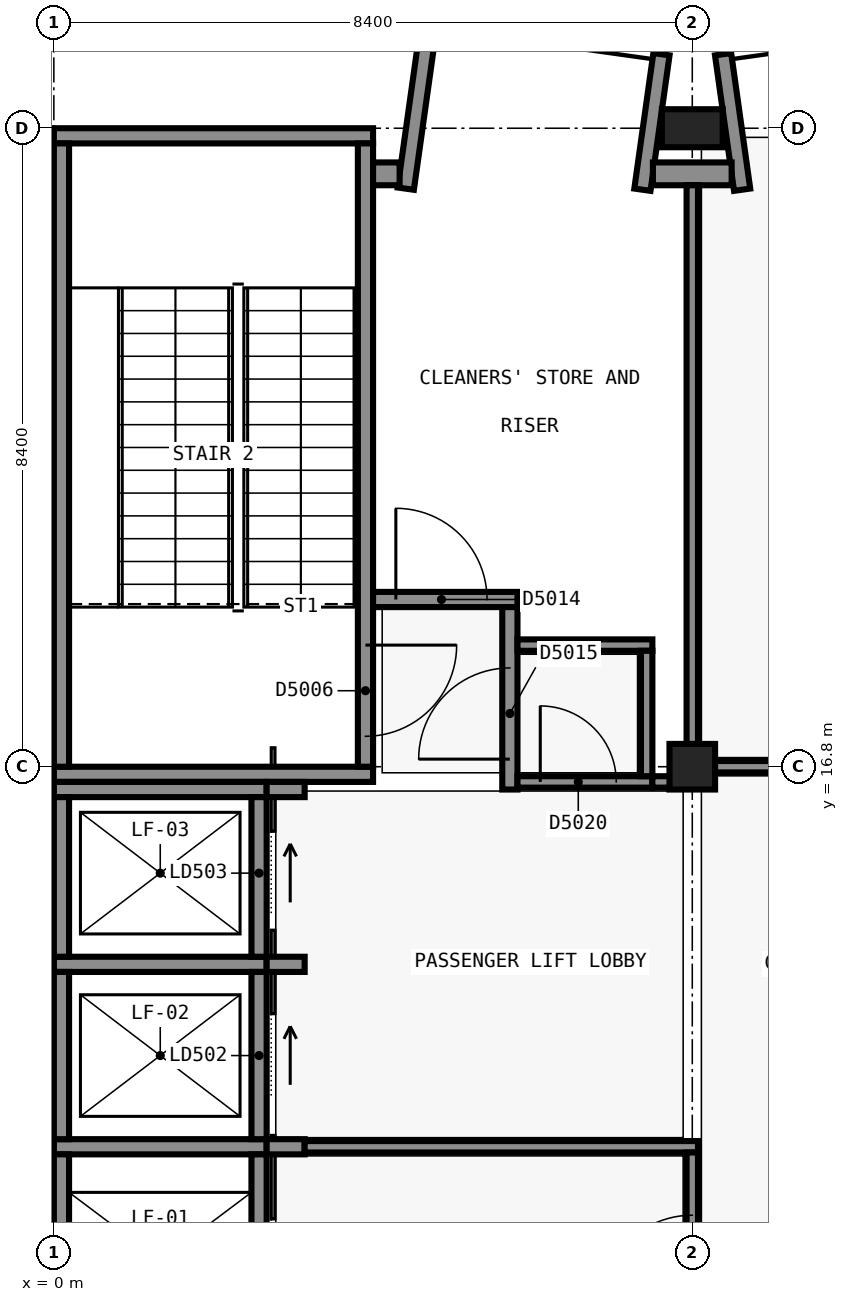
"""IFC4 building model, lengths in metres.
Left out: names, types, materials, properties, quantities, classifications, styles, units other than length and angle.
Written with IfcOpenShell. Run it as: python <this file> out.ifc"""

import sys

from ifc_helpers import new_model, si_unit, direction, frame, frame_2d, origin, origin_2d, place, context, subcontext, project, spatial, rectangle, extrude, element, fill, save


model = new_model("IFC4")
c1 = context("Model", 3, precision=1e-05, world=origin(), true_north=direction((0.0, 1.0)))
c2 = subcontext(c1, "Body", "Model", "MODEL_VIEW")
j1 = project(units=[si_unit("LENGTHUNIT", "METRE"), si_unit("PLANEANGLEUNIT", "RADIAN")], contexts=[c1])
p1 = place(None, origin())
s1 = spatial("IfcSite", under=j1, at=p1, CompositionType="ELEMENT")
p2 = place(p1, origin())
s2 = spatial("IfcBuilding", under=s1, at=p2, CompositionType="ELEMENT")
p3 = place(p2, frame((0.0, 0.0, 24.6)))
s3 = spatial("IfcBuildingStorey", under=s2, at=p3, CompositionType="ELEMENT", Elevation=24.6)
for number, where, z_axis, x_axis in (
    (1, (4.2, 16.7, 0.0), (0.0, 0.0, 1.0), (-1.0, 0.0, 0.0)),
    (2, (0.0, 25.1, 0.0), (0.0, 0.0, 1.0), (1.0, 0.0, 0.0)),
):
    element("IfcWall", number, at=place(p3, frame(where, z_axis=z_axis, x_axis=x_axis)), inside=s3, PredefinedType="SHEAR", context=c2, shape_type="SweptSolid", body=[
        extrude(rectangle(XDim=4.199, YDim=0.2, at=frame_2d((2.1, 0.0))), origin(), (0.0, 0.0, 1.0), 4.5),
    ])
p4 = place(p3, frame((0.1, 16.8, 0.0), z_axis=(0.0, 0.0, 1.0), x_axis=(0.0, 1.0, 0.0)))
e3 = element("IfcWall", 3, at=p4, inside=s3, PredefinedType="SHEAR", context=c2, shape_type="SweptSolid", body=[
    extrude(rectangle(XDim=8.2, YDim=0.2, at=frame_2d((4.1, 0.0))), origin(), (0.0, 0.0, 1.0), 4.5),
])
p5 = place(p3, frame((4.1, 25.0, 0.0), z_axis=(0.0, 0.0, 1.0), x_axis=(0.0, -1.0, 0.0)))
e4 = element("IfcWall", 4, at=p5, inside=s3, PredefinedType="SHEAR", context=c2, shape_type="SweptSolid", body=[
    extrude(rectangle(XDim=8.2, YDim=0.2, at=frame_2d((4.1, 0.0))), origin(), (0.0, 0.0, 1.0), 4.5),
])
p6 = place(p5, frame((6.6, 0.0, 0.0)))
e5 = element("IfcOpeningElement", 5, at=p6, cuts=e4, PredefinedType="OPENING", context=c2, shape_type="SweptSolid", body=[
    extrude(rectangle(XDim=1.2, YDim=2.1, at=frame_2d((0.6, 1.05))), frame((0.0, 0.11, 0.0), z_axis=(0.0, -1.0, 0.0), x_axis=(1.0, 0.0, 0.0)), (0.0, 0.0, 1.0), 0.22),
])
p7 = place(p3, frame((0.0, 11.8, 0.0), z_axis=(0.0, 0.0, 1.0), x_axis=(1.0, 0.0, 0.0)))
e6 = element("IfcWall", 6, at=p7, inside=s3, PredefinedType="SHEAR", context=c2, shape_type="SweptSolid", body=[
    extrude(rectangle(XDim=2.8, YDim=0.2, at=frame_2d((1.4, 0.0))), origin(), (0.0, 0.0, 1.0), 4.5),
])
p8 = place(p3, frame((0.1, 9.0, 0.0), z_axis=(0.0, 0.0, 1.0), x_axis=(0.0, 1.0, 0.0)))
e7 = element("IfcWall", 7, at=p8, inside=s3, PredefinedType="SHEAR", context=c2, shape_type="SweptSolid", body=[
    extrude(rectangle(XDim=2.7, YDim=0.2, at=frame_2d((1.35, 0.0))), origin(), (0.0, 0.0, 1.0), 4.5),
])
p9 = place(p3, frame((2.7, 11.7, 0.0), z_axis=(0.0, 0.0, 1.0), x_axis=(0.0, -1.0, 0.0)))
e8 = element("IfcWall", 8, at=p9, inside=s3, PredefinedType="SHEAR", context=c2, shape_type="SweptSolid", body=[
    extrude(rectangle(XDim=2.7, YDim=0.2, at=frame_2d((1.35, 0.0))), origin(), (0.0, 0.0, 1.0), 4.5),
])
p10 = place(p9, frame((0.85, 0.0, 0.0)))
e9 = element("IfcOpeningElement", 9, at=p10, cuts=e8, PredefinedType="OPENING", context=c2, shape_type="SweptSolid", body=[
    extrude(rectangle(XDim=1.1, YDim=2.1, at=frame_2d((0.55, 1.05))), frame((0.0, 0.11, 0.0), z_axis=(0.0, -1.0, 0.0), x_axis=(1.0, 0.0, 0.0)), (0.0, 0.0, 1.0), 0.22),
])
p11 = place(p3, frame((0.0, 14.2, 0.0), z_axis=(0.0, 0.0, 1.0), x_axis=(1.0, 0.0, 0.0)))
e10 = element("IfcWall", 10, at=p11, inside=s3, PredefinedType="SHEAR", context=c2, shape_type="SweptSolid", body=[
    extrude(rectangle(XDim=2.8, YDim=0.2, at=frame_2d((1.4, 0.0))), origin(), (0.0, 0.0, 1.0), 4.5),
])
p12 = place(p3, frame((0.1, 11.9, 0.0), z_axis=(0.0, 0.0, 1.0), x_axis=(0.0, 1.0, 0.0)))
e11 = element("IfcWall", 11, at=p12, inside=s3, PredefinedType="SHEAR", context=c2, shape_type="SweptSolid", body=[
    extrude(rectangle(XDim=2.2, YDim=0.2, at=frame_2d((1.1, 0.0))), origin(), (0.0, 0.0, 1.0), 4.5),
])
p13 = place(p3, frame((2.7, 14.1, 0.0), z_axis=(0.0, 0.0, 1.0), x_axis=(0.0, -1.0, 0.0)))
e12 = element("IfcWall", 12, at=p13, inside=s3, PredefinedType="SHEAR", context=c2, shape_type="SweptSolid", body=[
    extrude(rectangle(XDim=2.2, YDim=0.2, at=frame_2d((1.1, 0.0))), origin(), (0.0, 0.0, 1.0), 4.5),
])
p14 = place(p13, frame((0.55, 0.0, 0.0)))
e13 = element("IfcOpeningElement", 13, at=p14, cuts=e12, PredefinedType="OPENING", context=c2, shape_type="SweptSolid", body=[
    extrude(rectangle(XDim=1.1, YDim=2.1, at=frame_2d((0.55, 1.05))), frame((0.0, 0.11, 0.0), z_axis=(0.0, -1.0, 0.0), x_axis=(1.0, 0.0, 0.0)), (0.0, 0.0, 1.0), 0.22),
])
p15 = place(p3, frame((0.0, 16.5, 0.0), z_axis=(0.0, 0.0, 1.0), x_axis=(1.0, 0.0, 0.0)))
e14 = element("IfcWall", 14, at=p15, inside=s3, PredefinedType="SHEAR", context=c2, shape_type="SweptSolid", body=[
    extrude(rectangle(XDim=2.8, YDim=0.2, at=frame_2d((1.4, 0.0))), origin(), (0.0, 0.0, 1.0), 4.5),
])
p16 = place(p3, frame((0.1, 14.3, 0.0), z_axis=(0.0, 0.0, 1.0), x_axis=(0.0, 1.0, 0.0)))
e15 = element("IfcWall", 15, at=p16, inside=s3, PredefinedType="SHEAR", context=c2, shape_type="SweptSolid", body=[
    extrude(rectangle(XDim=2.1, YDim=0.2, at=frame_2d((1.05, 0.0))), origin(), (0.0, 0.0, 1.0), 4.5),
])
p17 = place(p3, frame((2.7, 16.4, 0.0), z_axis=(0.0, 0.0, 1.0), x_axis=(0.0, -1.0, 0.0)))
e16 = element("IfcWall", 16, at=p17, inside=s3, PredefinedType="SHEAR", context=c2, shape_type="SweptSolid", body=[
    extrude(rectangle(XDim=2.1, YDim=0.2, at=frame_2d((1.05, 0.0))), origin(), (0.0, 0.0, 1.0), 4.5),
])
p18 = place(p17, frame((0.45, 0.0, 0.0)))
e17 = element("IfcOpeningElement", 17, at=p18, cuts=e16, PredefinedType="OPENING", context=c2, shape_type="SweptSolid", body=[
    extrude(rectangle(XDim=1.1, YDim=2.1, at=frame_2d((0.55, 1.05))), frame((0.0, 0.11, 0.0), z_axis=(0.0, -1.0, 0.0), x_axis=(1.0, 0.0, 0.0)), (0.0, 0.0, 1.0), 0.22),
])
p19 = place(p3, frame((8.4, 16.8, 0.0), z_axis=(0.0, 0.0, 1.0), x_axis=(1.0, 0.0, 0.0)))
e18 = element("IfcColumn", 18, at=p19, inside=s3, PredefinedType="COLUMN", context=c2, shape_type="SweptSolid", body=[
    extrude(rectangle(XDim=0.6, YDim=0.6, at=origin_2d()), origin(), (0.0, 0.0, 1.0), 4.5),
])
p20 = place(p3, frame((8.4, 25.2, 0.0), z_axis=(0.0, 0.0, 1.0), x_axis=(1.0, 0.0, 0.0)))
e19 = element("IfcColumn", 19, at=p20, inside=s3, PredefinedType="COLUMN", context=c2, shape_type="SweptSolid", body=[
    extrude(rectangle(XDim=0.8, YDim=0.5, at=origin_2d()), origin(), (0.0, 0.0, 1.0), 4.5),
])
for number, where, z_axis, x_axis in (
    (20, (2.8, 11.8, 0.0), (0.0, 0.0, 1.0), (1.0, 0.0, 0.0)),
    (21, (2.8, 14.2, 0.0), (0.0, 0.0, 1.0), (1.0, 0.0, 0.0)),
    (22, (2.8, 16.5, 0.0), (0.0, 0.0, 1.0), (1.0, 0.0, 0.0)),
):
    element("IfcWall", number, at=place(p3, frame(where, z_axis=z_axis, x_axis=x_axis)), inside=s3, PredefinedType="SHEAR", context=c2, shape_type="SweptSolid", body=[
        extrude(rectangle(XDim=0.5, YDim=0.2, at=frame_2d((0.25, 0.0))), origin(), (0.0, 0.0, 1.0), 4.5),
    ])
p21 = place(p3, frame((4.631, 24.405, 0.0), z_axis=(0.0, 0.0, 1.0), x_axis=(0.139141913905, 0.990272451295, 0.0)))
e23 = element("IfcWall", 23, at=p21, inside=s3, PredefinedType="SOLIDWALL", context=c2, shape_type="SweptSolid", body=[
    extrude(rectangle(XDim=2.219, YDim=0.215, at=frame_2d((1.11, 0.0))), origin(), (0.0, 0.0, 1.0), 4.2),
])
for number, where, z_axis, x_axis in (
    (24, (7.744, 24.391, 0.0), (0.0, 0.0, 1.0), (0.139, 0.99, 0.0)),
    (25, (9.056, 24.391, 0.0), (0.0, 0.0, 1.0), (-0.139, 0.99, 0.0)),
):
    element("IfcWall", number, at=place(p3, frame(where, z_axis=z_axis, x_axis=x_axis)), inside=s3, PredefinedType="SOLIDWALL", context=c2, shape_type="SweptSolid", body=[
        extrude(rectangle(XDim=1.8, YDim=0.215, at=frame_2d((0.9, 0.0))), origin(), (0.0, 0.0, 1.0), 4.2),
    ])
p22 = place(p3, frame((4.2, 24.6, 0.0), z_axis=(0.0, 0.0, 1.0), x_axis=(1.0, 0.0, 0.0)))
e26 = element("IfcWall", 26, at=p22, inside=s3, PredefinedType="SOLIDWALL", context=c2, shape_type="SweptSolid", body=[
    extrude(rectangle(XDim=0.349, YDim=0.3, at=frame_2d((0.175, 0.0))), origin(), (0.0, 0.0, 1.0), 4.2),
])
p23 = place(p3, frame((7.882, 24.6, 0.0), z_axis=(0.0, 0.0, 1.0), x_axis=(1.0, 0.0, 0.0)))
e27 = element("IfcWall", 27, at=p23, inside=s3, PredefinedType="SOLIDWALL", context=c2, shape_type="SweptSolid", body=[
    extrude(rectangle(XDim=1.036, YDim=0.3, at=frame_2d((0.518, 0.0))), origin(), (0.0, 0.0, 1.0), 4.2),
])
p24 = place(p3, frame((4.2, 19.0, 0.0), z_axis=(0.0, 0.0, 1.0), x_axis=(1.0, 0.0, 0.0)))
e28 = element("IfcWall", 28, at=p24, inside=s3, PredefinedType="SOLIDWALL", context=c2, shape_type="SweptSolid", body=[
    extrude(rectangle(XDim=1.9, YDim=0.2, at=frame_2d((0.95, 0.0))), origin(), (0.0, 0.0, 1.0), 4.2),
])
p25 = place(p24, frame((0.3, 0.0, 0.0)))
e29 = element("IfcOpeningElement", 29, at=p25, cuts=e28, PredefinedType="OPENING", context=c2, shape_type="SweptSolid", body=[
    extrude(rectangle(XDim=1.2, YDim=2.1, at=frame_2d((0.6, 1.05))), frame((0.0, 0.11, 0.0), z_axis=(0.0, -1.0, 0.0), x_axis=(1.0, 0.0, 0.0)), (0.0, 0.0, 1.0), 0.22),
])
p26 = place(p3, frame((6.0, 16.5, 0.0), z_axis=(0.0, 0.0, 1.0), x_axis=(0.0, 1.0, 0.0)))
e30 = element("IfcWall", 30, at=p26, inside=s3, PredefinedType="SOLIDWALL", context=c2, shape_type="SweptSolid", body=[
    extrude(rectangle(XDim=2.4, YDim=0.2, at=frame_2d((1.2, 0.0))), origin(), (0.0, 0.0, 1.0), 3.7),
])
p27 = place(p26, frame((0.4, 0.0, 0.0)))
e31 = element("IfcOpeningElement", 31, at=p27, cuts=e30, PredefinedType="OPENING", context=c2, shape_type="SweptSolid", body=[
    extrude(rectangle(XDim=1.2, YDim=2.1, at=frame_2d((0.6, 1.05))), frame((0.0, 0.11, 0.0), z_axis=(0.0, -1.0, 0.0), x_axis=(1.0, 0.0, 0.0)), (0.0, 0.0, 1.0), 0.22),
])
p28 = place(p3, frame((6.1, 16.6, 0.0), z_axis=(0.0, 0.0, 1.0), x_axis=(1.0, 0.0, 0.0)))
e32 = element("IfcWall", 32, at=p28, inside=s3, PredefinedType="PARTITIONING", context=c2, shape_type="SweptSolid", body=[
    extrude(rectangle(XDim=1.775, YDim=0.15, at=frame_2d((0.887, 0.0))), origin(), (0.0, 0.0, 1.0), 3.7),
])
p29 = place(p28, frame((0.3, 0.0, 0.0)))
e33 = element("IfcOpeningElement", 33, at=p29, cuts=e32, PredefinedType="OPENING", context=c2, shape_type="SweptSolid", body=[
    extrude(rectangle(XDim=1.0, YDim=2.1, at=frame_2d((0.5, 1.05))), frame((0.0, 0.085, 0.0), z_axis=(0.0, -1.0, 0.0), x_axis=(1.0, 0.0, 0.0)), (0.0, 0.0, 1.0), 0.17),
])
p30 = place(p3, frame((8.325, 16.8, 0.0), z_axis=(0.0, 0.0, 1.0), x_axis=(1.0, 0.0, 0.0)))
e34 = element("IfcWall", 34, at=p30, inside=s3, PredefinedType="PARTITIONING", context=c2, shape_type="SweptSolid", body=[
    extrude(rectangle(XDim=4.35, YDim=0.15, at=frame_2d((2.175, 0.0))), origin(), (0.0, 0.0, 1.0), 3.5),
])
p31 = place(p3, frame((3.3, 11.8, 0.0), z_axis=(0.0, 0.0, 1.0), x_axis=(1.0, 0.0, 0.0)))
e35 = element("IfcWall", 35, at=p31, inside=s3, PredefinedType="SOLIDWALL", context=c2, shape_type="SweptSolid", body=[
    extrude(rectangle(XDim=5.175, YDim=0.15, at=frame_2d((2.587, 0.0))), origin(), (0.0, 0.0, 1.0), 3.5),
])
p32 = place(p3, frame((7.875, 16.6, 0.0), z_axis=(0.0, 0.0, 1.0), x_axis=(1.0, 0.0, 0.0)))
e36 = element("IfcWall", 36, at=p32, inside=s3, PredefinedType="SOLIDWALL", context=c2, shape_type="SweptSolid", body=[
    extrude(rectangle(XDim=0.6, YDim=0.15, at=frame_2d((0.3, 0.0))), origin(), (0.0, 0.0, 1.0), 3.5),
])
p33 = place(p3, frame((6.1, 18.4, 0.0), z_axis=(0.0, 0.0, 1.0), x_axis=(1.0, 0.0, 0.0)))
e37 = element("IfcWall", 37, at=p33, inside=s3, PredefinedType="SOLIDWALL", context=c2, shape_type="SweptSolid", body=[
    extrude(rectangle(XDim=1.775, YDim=0.15, at=frame_2d((0.887, 0.0))), origin(), (0.0, 0.0, 1.0), 4.2),
])
p34 = place(p3, frame((8.4, 8.875, 0.0), z_axis=(0.0, 0.0, 1.0), x_axis=(0.0, 1.0, 0.0)))
e38 = element("IfcWall", 38, at=p34, inside=s3, PredefinedType="SOLIDWALL", context=c2, shape_type="SweptSolid", body=[
    extrude(rectangle(XDim=2.85, YDim=0.15, at=frame_2d((1.425, 0.0))), origin(), (0.0, 0.0, 1.0), 3.5),
])
p35 = place(p34, frame((0.825, 0.0, 0.0)))
e39 = element("IfcOpeningElement", 39, at=p35, cuts=e38, PredefinedType="OPENING", context=c2, shape_type="SweptSolid", body=[
    extrude(rectangle(XDim=1.2, YDim=2.1, at=frame_2d((0.6, 1.05))), frame((0.0, 0.085, 0.0), z_axis=(0.0, -1.0, 0.0), x_axis=(1.0, 0.0, 0.0)), (0.0, 0.0, 1.0), 0.17),
])
p36 = place(p3, frame((7.8, 16.675, 0.0), z_axis=(0.0, 0.0, 1.0), x_axis=(0.0, 1.0, 0.0)))
e40 = element("IfcWall", 40, at=p36, inside=s3, PredefinedType="SOLIDWALL", context=c2, shape_type="SweptSolid", body=[
    extrude(rectangle(XDim=1.65, YDim=0.15, at=frame_2d((0.825, 0.0))), origin(), (0.0, 0.0, 1.0), 3.7),
])
p37 = place(p3, frame((8.4, 16.875, 0.0), z_axis=(0.0, 0.0, 1.0), x_axis=(0.0, 1.0, 0.0)))
e41 = element("IfcWall", 41, at=p37, inside=s3, PredefinedType="SOLIDWALL", context=c2, shape_type="SweptSolid", body=[
    extrude(rectangle(XDim=7.575, YDim=0.15, at=frame_2d((3.788, 0.0))), origin(), (0.0, 0.0, 1.0), 3.5),
])
p38 = place(p10, origin())
e42 = element("IfcDoor", 42, at=p38, inside=s3, OperationType="SLIDING_TO_LEFT", PredefinedType="DOOR", context=c2, shape_type="SweptSolid", body=[
    extrude(rectangle(XDim=1.1, YDim=2.1, at=frame_2d((0.55, 1.05))), frame((0.0, 0.025, 0.0), z_axis=(0.0, -1.0, 0.0), x_axis=(1.0, 0.0, 0.0)), (0.0, 0.0, 1.0), 0.05),
])
fill(e9, e42)
p39 = place(p14, origin())
e43 = element("IfcDoor", 43, at=p39, inside=s3, OperationType="SLIDING_TO_LEFT", PredefinedType="DOOR", context=c2, shape_type="SweptSolid", body=[
    extrude(rectangle(XDim=1.1, YDim=2.1, at=frame_2d((0.55, 1.05))), frame((0.0, 0.025, 0.0), z_axis=(0.0, -1.0, 0.0), x_axis=(1.0, 0.0, 0.0)), (0.0, 0.0, 1.0), 0.05),
])
fill(e13, e43)
p40 = place(p18, origin())
e44 = element("IfcDoor", 44, at=p40, inside=s3, OperationType="SLIDING_TO_LEFT", PredefinedType="DOOR", context=c2, shape_type="SweptSolid", body=[
    extrude(rectangle(XDim=1.1, YDim=2.1, at=frame_2d((0.55, 1.05))), frame((0.0, 0.025, 0.0), z_axis=(0.0, -1.0, 0.0), x_axis=(1.0, 0.0, 0.0)), (0.0, 0.0, 1.0), 0.05),
])
fill(e17, e44)
p41 = place(p6, origin())
e45 = element("IfcDoor", 45, at=p41, inside=s3, OperationType="SINGLE_SWING_RIGHT", PredefinedType="DOOR", context=c2, shape_type="SweptSolid", body=[
    extrude(rectangle(XDim=1.2, YDim=2.1, at=frame_2d((0.6, 1.05))), frame((0.0, 0.025, 0.0), z_axis=(0.0, -1.0, 0.0), x_axis=(1.0, 0.0, 0.0)), (0.0, 0.0, 1.0), 0.05),
])
fill(e5, e45)
p42 = place(p25, origin())
e46 = element("IfcDoor", 46, at=p42, inside=s3, OperationType="SINGLE_SWING_LEFT", PredefinedType="DOOR", context=c2, shape_type="SweptSolid", body=[
    extrude(rectangle(XDim=1.2, YDim=2.1, at=frame_2d((0.6, 1.05))), frame((0.0, 0.025, 0.0), z_axis=(0.0, -1.0, 0.0), x_axis=(1.0, 0.0, 0.0)), (0.0, 0.0, 1.0), 0.05),
])
fill(e29, e46)
p43 = place(p27, origin())
e47 = element("IfcDoor", 47, at=p43, inside=s3, OperationType="SINGLE_SWING_RIGHT", PredefinedType="DOOR", context=c2, shape_type="SweptSolid", body=[
    extrude(rectangle(XDim=1.2, YDim=2.1, at=frame_2d((0.6, 1.05))), frame((0.0, 0.025, 0.0), z_axis=(0.0, -1.0, 0.0), x_axis=(1.0, 0.0, 0.0)), (0.0, 0.0, 1.0), 0.05),
])
fill(e31, e47)
p44 = place(p29, origin())
e48 = element("IfcDoor", 48, at=p44, inside=s3, OperationType="SINGLE_SWING_RIGHT", PredefinedType="DOOR", context=c2, shape_type="SweptSolid", body=[
    extrude(rectangle(XDim=1.0, YDim=2.1, at=frame_2d((0.5, 1.05))), frame((0.0, 0.025, 0.0), z_axis=(0.0, -1.0, 0.0), x_axis=(1.0, 0.0, 0.0)), (0.0, 0.0, 1.0), 0.05),
])
fill(e33, e48)
p45 = place(p35, origin())
e49 = element("IfcDoor", 49, at=p45, inside=s3, OperationType="SINGLE_SWING_RIGHT", PredefinedType="DOOR", context=c2, shape_type="SweptSolid", body=[
    extrude(rectangle(XDim=1.2, YDim=2.1, at=frame_2d((0.6, 1.05))), frame((0.0, 0.025, 0.0), z_axis=(0.0, -1.0, 0.0), x_axis=(1.0, 0.0, 0.0)), (0.0, 0.0, 1.0), 0.05),
])
fill(e39, e49)
save(model, sys.argv[1])
